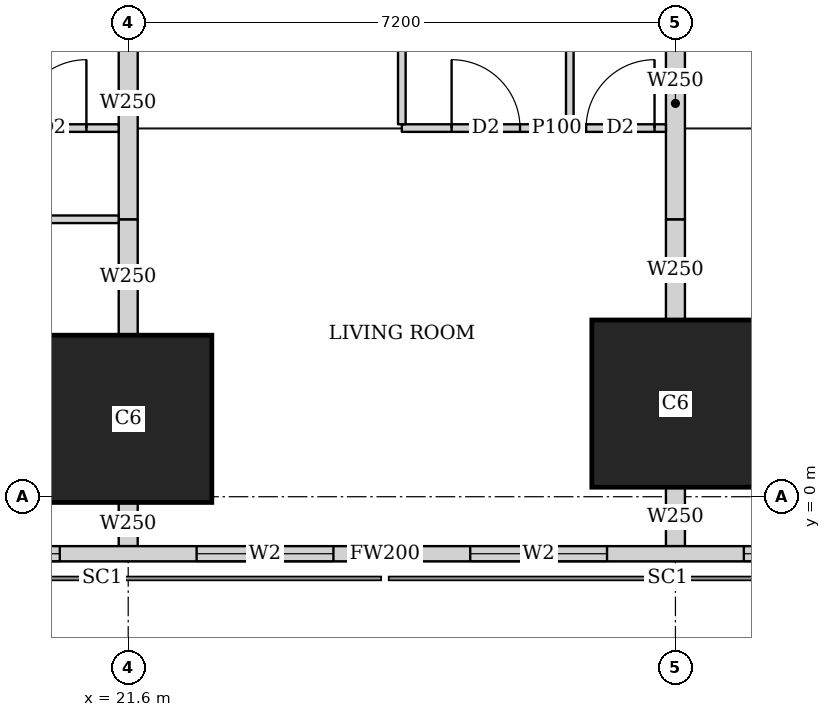
"""IFC4 building model, lengths in metres.
Left out: names, types, materials, properties, quantities, classifications, styles, units other than length and angle.
Written with IfcOpenShell. Run it as: python <this file> out.ifc"""

import sys

from ifc_helpers import new_model, si_unit, direction, frame, frame_2d, origin, origin_2d, place, context, subcontext, project, spatial, rectangle, extrude, element, fill, save


model = new_model("IFC4")
c1 = context("Model", 3, precision=1e-05, world=origin(), true_north=direction((0.0, 1.0)))
c2 = subcontext(c1, "Body", "Model", "MODEL_VIEW")
j1 = project(units=[si_unit("LENGTHUNIT", "METRE"), si_unit("PLANEANGLEUNIT", "RADIAN")], contexts=[c1])
p1 = place(None, origin())
s1 = spatial("IfcSite", under=j1, at=p1, CompositionType="ELEMENT")
p2 = place(p1, origin())
s2 = spatial("IfcBuilding", under=s1, at=p2, CompositionType="ELEMENT")
p3 = place(p2, frame((0.0, 0.0, 126.65)))
s3 = spatial("IfcBuildingStorey", under=s2, at=p3, CompositionType="ELEMENT", Elevation=126.65)
for number, where, z_axis, x_axis in (
    (1, (21.6, 1.025, 0.0), (0.0, 0.0, 1.0), (1.0, 0.0, 0.0)),
    (2, (28.8, 1.225, 0.0), (0.0, 0.0, 1.0), (1.0, 0.0, 0.0)),
):
    element("IfcColumn", number, at=place(p3, frame(where, z_axis=z_axis, x_axis=x_axis)), inside=s3, PredefinedType="COLUMN", context=c2, shape_type="SweptSolid", body=[
        extrude(rectangle(XDim=2.2, YDim=2.2, at=origin_2d()), origin(), (0.0, 0.0, 1.0), 3.75),
    ])
p4 = place(p3, frame((2.163, -0.75, 0.0), z_axis=(0.0, 0.0, 1.0), x_axis=(1.0, 0.0, 0.0)))
e3 = element("IfcWall", 3, at=p4, inside=s3, PredefinedType="SOLIDWALL", context=c2, shape_type="SweptSolid", body=[
    extrude(rectangle(XDim=45.628, YDim=0.2, at=frame_2d((22.814, 0.0))), origin(), (0.0, 0.0, 1.0), 3.45),
])
p5 = place(p4, frame((9.537, 0.0, 0.9)))
e4 = element("IfcOpeningElement", 4, at=p5, cuts=e3, PredefinedType="OPENING", context=c2, shape_type="SweptSolid", body=[
    extrude(rectangle(XDim=1.8, YDim=1.5, at=frame_2d((0.9, 0.75))), frame((0.0, 0.11, 0.0), z_axis=(0.0, -1.0, 0.0), x_axis=(1.0, 0.0, 0.0)), (0.0, 0.0, 1.0), 0.22),
])
p6 = place(p4, frame((13.137, 0.0, 0.9)))
e5 = element("IfcOpeningElement", 5, at=p6, cuts=e3, PredefinedType="OPENING", context=c2, shape_type="SweptSolid", body=[
    extrude(rectangle(XDim=1.8, YDim=1.5, at=frame_2d((0.9, 0.75))), frame((0.0, 0.11, 0.0), z_axis=(0.0, -1.0, 0.0), x_axis=(1.0, 0.0, 0.0)), (0.0, 0.0, 1.0), 0.22),
])
p7 = place(p4, frame((16.737, 0.0, 0.9)))
e6 = element("IfcOpeningElement", 6, at=p7, cuts=e3, PredefinedType="OPENING", context=c2, shape_type="SweptSolid", body=[
    extrude(rectangle(XDim=1.8, YDim=1.5, at=frame_2d((0.9, 0.75))), frame((0.0, 0.11, 0.0), z_axis=(0.0, -1.0, 0.0), x_axis=(1.0, 0.0, 0.0)), (0.0, 0.0, 1.0), 0.22),
])
p8 = place(p4, frame((20.337, 0.0, 0.9)))
e7 = element("IfcOpeningElement", 7, at=p8, cuts=e3, PredefinedType="OPENING", context=c2, shape_type="SweptSolid", body=[
    extrude(rectangle(XDim=1.8, YDim=1.5, at=frame_2d((0.9, 0.75))), frame((0.0, 0.11, 0.0), z_axis=(0.0, -1.0, 0.0), x_axis=(1.0, 0.0, 0.0)), (0.0, 0.0, 1.0), 0.22),
])
p9 = place(p4, frame((23.937, 0.0, 0.9)))
e8 = element("IfcOpeningElement", 8, at=p9, cuts=e3, PredefinedType="OPENING", context=c2, shape_type="SweptSolid", body=[
    extrude(rectangle(XDim=1.8, YDim=1.5, at=frame_2d((0.9, 0.75))), frame((0.0, 0.11, 0.0), z_axis=(0.0, -1.0, 0.0), x_axis=(1.0, 0.0, 0.0)), (0.0, 0.0, 1.0), 0.22),
])
p10 = place(p4, frame((27.537, 0.0, 0.9)))
e9 = element("IfcOpeningElement", 9, at=p10, cuts=e3, PredefinedType="OPENING", context=c2, shape_type="SweptSolid", body=[
    extrude(rectangle(XDim=1.8, YDim=1.5, at=frame_2d((0.9, 0.75))), frame((0.0, 0.11, 0.0), z_axis=(0.0, -1.0, 0.0), x_axis=(1.0, 0.0, 0.0)), (0.0, 0.0, 1.0), 0.22),
])
p11 = place(p4, frame((31.137, 0.0, 0.9)))
e10 = element("IfcOpeningElement", 10, at=p11, cuts=e3, PredefinedType="OPENING", context=c2, shape_type="SweptSolid", body=[
    extrude(rectangle(XDim=1.8, YDim=1.5, at=frame_2d((0.9, 0.75))), frame((0.0, 0.11, 0.0), z_axis=(0.0, -1.0, 0.0), x_axis=(1.0, 0.0, 0.0)), (0.0, 0.0, 1.0), 0.22),
])
p12 = place(p4, frame((34.737, 0.0, 0.9)))
e11 = element("IfcOpeningElement", 11, at=p12, cuts=e3, PredefinedType="OPENING", context=c2, shape_type="SweptSolid", body=[
    extrude(rectangle(XDim=1.8, YDim=1.5, at=frame_2d((0.9, 0.75))), frame((0.0, 0.11, 0.0), z_axis=(0.0, -1.0, 0.0), x_axis=(1.0, 0.0, 0.0)), (0.0, 0.0, 1.0), 0.22),
])
p13 = place(p3, frame((21.475, 3.65, 0.0), z_axis=(0.0, 0.0, 1.0), x_axis=(-1.0, 0.0, 0.0)))
e12 = element("IfcWall", 12, at=p13, inside=s3, PredefinedType="PARTITIONING", context=c2, shape_type="SweptSolid", body=[
    extrude(rectangle(XDim=7.075, YDim=0.1, at=frame_2d((3.538, 0.0))), origin(), (0.0, 0.0, 1.0), 3.45),
])
p14 = place(p13, frame((5.975, 0.0, 0.0)))
e13 = element("IfcOpeningElement", 13, at=p14, cuts=e12, PredefinedType="OPENING", context=c2, shape_type="SweptSolid", body=[
    extrude(rectangle(XDim=0.9, YDim=2.1, at=frame_2d((0.45, 1.05))), frame((0.0, 0.06, 0.0), z_axis=(0.0, -1.0, 0.0), x_axis=(1.0, 0.0, 0.0)), (0.0, 0.0, 1.0), 0.12),
])
p15 = place(p13, frame((2.375, 0.0, 0.0)))
e14 = element("IfcOpeningElement", 14, at=p15, cuts=e12, PredefinedType="OPENING", context=c2, shape_type="SweptSolid", body=[
    extrude(rectangle(XDim=0.9, YDim=2.1, at=frame_2d((0.45, 1.05))), frame((0.0, 0.06, 0.0), z_axis=(0.0, -1.0, 0.0), x_axis=(1.0, 0.0, 0.0)), (0.0, 0.0, 1.0), 0.12),
])
p16 = place(p3, frame((21.475, 4.85, 0.0), z_axis=(0.0, 0.0, 1.0), x_axis=(-1.0, 0.0, 0.0)))
e15 = element("IfcWall", 15, at=p16, inside=s3, PredefinedType="PARTITIONING", context=c2, shape_type="SweptSolid", body=[
    extrude(rectangle(XDim=7.075, YDim=0.1, at=frame_2d((3.538, 0.0))), origin(), (0.0, 0.0, 1.0), 3.45),
])
p17 = place(p16, frame((5.52, 0.0, 0.0)))
e16 = element("IfcOpeningElement", 16, at=p17, cuts=e15, PredefinedType="OPENING", context=c2, shape_type="SweptSolid", body=[
    extrude(rectangle(XDim=0.9, YDim=2.1, at=frame_2d((0.45, 1.05))), frame((0.0, 0.06, 0.0), z_axis=(0.0, -1.0, 0.0), x_axis=(1.0, 0.0, 0.0)), (0.0, 0.0, 1.0), 0.12),
])
p18 = place(p16, frame((2.225, 0.0, 0.0)))
e17 = element("IfcOpeningElement", 17, at=p18, cuts=e15, PredefinedType="OPENING", context=c2, shape_type="SweptSolid", body=[
    extrude(rectangle(XDim=0.9, YDim=2.1, at=frame_2d((0.45, 1.05))), frame((0.0, 0.06, 0.0), z_axis=(0.0, -1.0, 0.0), x_axis=(1.0, 0.0, 0.0)), (0.0, 0.0, 1.0), 0.12),
])
p19 = place(p16, frame((3.72, 0.0, 0.0)))
e18 = element("IfcOpeningElement", 18, at=p19, cuts=e15, PredefinedType="OPENING", context=c2, shape_type="SweptSolid", body=[
    extrude(rectangle(XDim=0.9, YDim=2.1, at=frame_2d((0.45, 1.05))), frame((0.0, 0.06, 0.0), z_axis=(0.0, -1.0, 0.0), x_axis=(1.0, 0.0, 0.0)), (0.0, 0.0, 1.0), 0.12),
])
p20 = place(p16, frame((0.425, 0.0, 0.0)))
e19 = element("IfcOpeningElement", 19, at=p20, cuts=e15, PredefinedType="OPENING", context=c2, shape_type="SweptSolid", body=[
    extrude(rectangle(XDim=0.9, YDim=2.1, at=frame_2d((0.45, 1.05))), frame((0.0, 0.06, 0.0), z_axis=(0.0, -1.0, 0.0), x_axis=(1.0, 0.0, 0.0)), (0.0, 0.0, 1.0), 0.12),
])
p21 = place(p3, frame((28.675, 4.85, 0.0), z_axis=(0.0, 0.0, 1.0), x_axis=(-1.0, 0.0, 0.0)))
e20 = element("IfcWall", 20, at=p21, inside=s3, PredefinedType="PARTITIONING", context=c2, shape_type="SweptSolid", body=[
    extrude(rectangle(XDim=3.475, YDim=0.1, at=frame_2d((1.738, 0.0))), origin(), (0.0, 0.0, 1.0), 3.45),
])
p22 = place(p21, frame((1.92, 0.0, 0.0)))
e21 = element("IfcOpeningElement", 21, at=p22, cuts=e20, PredefinedType="OPENING", context=c2, shape_type="SweptSolid", body=[
    extrude(rectangle(XDim=0.9, YDim=2.1, at=frame_2d((0.45, 1.05))), frame((0.0, 0.06, 0.0), z_axis=(0.0, -1.0, 0.0), x_axis=(1.0, 0.0, 0.0)), (0.0, 0.0, 1.0), 0.12),
])
p23 = place(p21, frame((0.15, 0.0, 0.0)))
e22 = element("IfcOpeningElement", 22, at=p23, cuts=e20, PredefinedType="OPENING", context=c2, shape_type="SweptSolid", body=[
    extrude(rectangle(XDim=0.9, YDim=2.1, at=frame_2d((0.45, 1.05))), frame((0.0, 0.06, 0.0), z_axis=(0.0, -1.0, 0.0), x_axis=(1.0, 0.0, 0.0)), (0.0, 0.0, 1.0), 0.12),
])
for number, where, z_axis, x_axis in (
    (23, (25.2, 4.9, 0.0), (0.0, 0.0, 1.0), (0.0, 1.0, 0.0)),
    (24, (27.41, 4.9, 0.0), (0.0, 0.0, 1.0), (0.0, 1.0, 0.0)),
):
    element("IfcWall", number, at=place(p3, frame(where, z_axis=z_axis, x_axis=x_axis)), inside=s3, PredefinedType="PARTITIONING", context=c2, shape_type="SweptSolid", body=[
        extrude(rectangle(XDim=3.275, YDim=0.1, at=frame_2d((1.638, 0.0))), origin(), (0.0, 0.0, 1.0), 3.45),
    ])
p24 = place(p3, frame((21.6, -0.65, 0.0), z_axis=(0.0, 0.0, 1.0), x_axis=(0.0, 1.0, 0.0)))
e25 = element("IfcWall", 25, at=p24, inside=s3, PredefinedType="SOLIDWALL", context=c2, shape_type="SweptSolid", body=[
    extrude(rectangle(XDim=0.574, YDim=0.25, at=frame_2d((0.287, 0.0))), origin(), (0.0, 0.0, 1.0), 3.45),
])
p25 = place(p3, frame((21.6, 2.126, 0.0), z_axis=(0.0, 0.0, 1.0), x_axis=(0.0, 1.0, 0.0)))
e26 = element("IfcWall", 26, at=p25, inside=s3, PredefinedType="SOLIDWALL", context=c2, shape_type="SweptSolid", body=[
    extrude(rectangle(XDim=1.524, YDim=0.25, at=frame_2d((0.762, 0.0))), origin(), (0.0, 0.0, 1.0), 3.45),
])
p26 = place(p3, frame((21.6, 3.65, 0.0), z_axis=(0.0, 0.0, 1.0), x_axis=(0.0, 1.0, 0.0)))
e27 = element("IfcWall", 27, at=p26, inside=s3, PredefinedType="SOLIDWALL", context=c2, shape_type="SweptSolid", body=[
    extrude(rectangle(XDim=3.049, YDim=0.25, at=frame_2d((1.524, 0.0))), origin(), (0.0, 0.0, 1.0), 3.45),
])
p27 = place(p3, frame((28.8, -0.65, 0.0), z_axis=(0.0, 0.0, 1.0), x_axis=(0.0, 1.0, 0.0)))
e28 = element("IfcWall", 28, at=p27, inside=s3, PredefinedType="SOLIDWALL", context=c2, shape_type="SweptSolid", body=[
    extrude(rectangle(XDim=0.774, YDim=0.25, at=frame_2d((0.387, 0.0))), origin(), (0.0, 0.0, 1.0), 3.45),
])
p28 = place(p3, frame((28.8, 2.326, 0.0), z_axis=(0.0, 0.0, 1.0), x_axis=(0.0, 1.0, 0.0)))
e29 = element("IfcWall", 29, at=p28, inside=s3, PredefinedType="SOLIDWALL", context=c2, shape_type="SweptSolid", body=[
    extrude(rectangle(XDim=1.324, YDim=0.25, at=frame_2d((0.662, 0.0))), origin(), (0.0, 0.0, 1.0), 3.45),
])
p29 = place(p3, frame((28.8, 3.65, 0.0), z_axis=(0.0, 0.0, 1.0), x_axis=(0.0, 1.0, 0.0)))
e30 = element("IfcWall", 30, at=p29, inside=s3, PredefinedType="SOLIDWALL", context=c2, shape_type="SweptSolid", body=[
    extrude(rectangle(XDim=3.049, YDim=0.25, at=frame_2d((1.524, 0.0))), origin(), (0.0, 0.0, 1.0), 3.45),
])
p30 = place(p7, origin())
e31 = element("IfcWindow", 31, at=p30, inside=s3, PartitioningType="SINGLE_PANEL", PredefinedType="WINDOW", context=c2, shape_type="SweptSolid", body=[
    extrude(rectangle(XDim=1.8, YDim=1.5, at=frame_2d((0.9, 0.75))), frame((0.0, 0.03, 0.0), z_axis=(0.0, -1.0, 0.0), x_axis=(1.0, 0.0, 0.0)), (0.0, 0.0, 1.0), 0.06),
])
fill(e6, e31)
p31 = place(p8, origin())
e32 = element("IfcWindow", 32, at=p31, inside=s3, PartitioningType="SINGLE_PANEL", PredefinedType="WINDOW", context=c2, shape_type="SweptSolid", body=[
    extrude(rectangle(XDim=1.8, YDim=1.5, at=frame_2d((0.9, 0.75))), frame((0.0, 0.03, 0.0), z_axis=(0.0, -1.0, 0.0), x_axis=(1.0, 0.0, 0.0)), (0.0, 0.0, 1.0), 0.06),
])
fill(e7, e32)
p32 = place(p9, origin())
e33 = element("IfcWindow", 33, at=p32, inside=s3, PartitioningType="SINGLE_PANEL", PredefinedType="WINDOW", context=c2, shape_type="SweptSolid", body=[
    extrude(rectangle(XDim=1.8, YDim=1.5, at=frame_2d((0.9, 0.75))), frame((0.0, 0.03, 0.0), z_axis=(0.0, -1.0, 0.0), x_axis=(1.0, 0.0, 0.0)), (0.0, 0.0, 1.0), 0.06),
])
fill(e8, e33)
p33 = place(p10, origin())
e34 = element("IfcWindow", 34, at=p33, inside=s3, PartitioningType="SINGLE_PANEL", PredefinedType="WINDOW", context=c2, shape_type="SweptSolid", body=[
    extrude(rectangle(XDim=1.8, YDim=1.5, at=frame_2d((0.9, 0.75))), frame((0.0, 0.03, 0.0), z_axis=(0.0, -1.0, 0.0), x_axis=(1.0, 0.0, 0.0)), (0.0, 0.0, 1.0), 0.06),
])
fill(e9, e34)
p34 = place(p20, origin())
e35 = element("IfcDoor", 35, at=p34, inside=s3, OperationType="SINGLE_SWING_RIGHT", PredefinedType="DOOR", context=c2, shape_type="SweptSolid", body=[
    extrude(rectangle(XDim=0.9, YDim=2.1, at=frame_2d((0.45, 1.05))), frame((0.0, 0.025, 0.0), z_axis=(0.0, -1.0, 0.0), x_axis=(1.0, 0.0, 0.0)), (0.0, 0.0, 1.0), 0.05),
])
fill(e19, e35)
p35 = place(p22, origin())
e36 = element("IfcDoor", 36, at=p35, inside=s3, OperationType="SINGLE_SWING_LEFT", PredefinedType="DOOR", context=c2, shape_type="SweptSolid", body=[
    extrude(rectangle(XDim=0.9, YDim=2.1, at=frame_2d((0.45, 1.05))), frame((0.0, 0.025, 0.0), z_axis=(0.0, -1.0, 0.0), x_axis=(1.0, 0.0, 0.0)), (0.0, 0.0, 1.0), 0.05),
])
fill(e21, e36)
p36 = place(p23, origin())
e37 = element("IfcDoor", 37, at=p36, inside=s3, OperationType="SINGLE_SWING_RIGHT", PredefinedType="DOOR", context=c2, shape_type="SweptSolid", body=[
    extrude(rectangle(XDim=0.9, YDim=2.1, at=frame_2d((0.45, 1.05))), frame((0.0, 0.025, 0.0), z_axis=(0.0, -1.0, 0.0), x_axis=(1.0, 0.0, 0.0)), (0.0, 0.0, 1.0), 0.05),
])
fill(e22, e37)
save(model, sys.argv[1])
